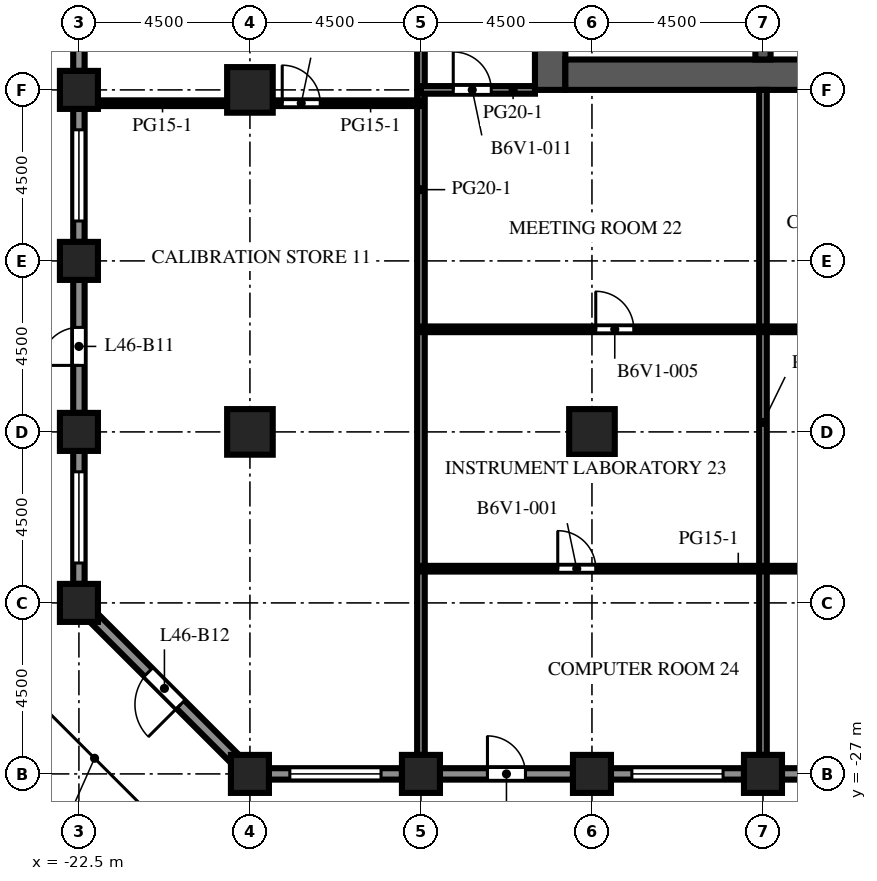
"""IFC4 building model, lengths in metres.
Left out: names, types, materials, properties, quantities, classifications, styles, units other than length and angle.
Written with IfcOpenShell. Run it as: python <this file> out.ifc"""

import sys

from ifc_helpers import new_model, si_unit, direction, frame, frame_2d, origin, origin_2d, place, context, subcontext, project, spatial, rectangle, extrude, element, fill, save


model = new_model("IFC4")
c1 = context("Model", 3, precision=1e-05, world=origin(), true_north=direction((0.0, 1.0)))
c2 = subcontext(c1, "Body", "Model", "MODEL_VIEW")
j1 = project(units=[si_unit("LENGTHUNIT", "METRE"), si_unit("PLANEANGLEUNIT", "RADIAN")], contexts=[c1])
p1 = place(None, origin())
s1 = spatial("IfcSite", under=j1, at=p1, CompositionType="ELEMENT")
p2 = place(p1, origin())
s2 = spatial("IfcBuilding", under=s1, at=p2, CompositionType="ELEMENT")
p3 = place(p2, frame((0.0, 0.0, 203.8)))
s3 = spatial("IfcBuildingStorey", under=s2, at=p3, CompositionType="ELEMENT", Elevation=203.8)
for number, where, z_axis, x_axis in (
    (1, (-22.5, -22.5, 0.0), (0.0, 0.0, 1.0), (1.0, 0.0, 0.0)),
    (2, (-22.5, -18.0, 0.0), (0.0, 0.0, 1.0), (1.0, 0.0, 0.0)),
    (3, (-22.5, -13.5, 0.0), (0.0, 0.0, 1.0), (1.0, 0.0, 0.0)),
    (4, (-22.5, -9.0, 0.0), (0.0, 0.0, 1.0), (1.0, 0.0, 0.0)),
    (5, (-18.0, -27.0, 0.0), (0.0, 0.0, 1.0), (1.0, 0.0, 0.0)),
    (6, (-13.5, -27.0, 0.0), (0.0, 0.0, 1.0), (1.0, 0.0, 0.0)),
    (7, (-9.0, -27.0, 0.0), (0.0, 0.0, 1.0), (1.0, 0.0, 0.0)),
    (8, (-4.5, -27.0, 0.0), (0.0, 0.0, 1.0), (1.0, 0.0, 0.0)),
):
    element("IfcColumn", number, at=place(p3, frame(where, z_axis=z_axis, x_axis=x_axis)), inside=s3, PredefinedType="COLUMN", context=c2, shape_type="SweptSolid", body=[
        extrude(rectangle(XDim=1.0, YDim=1.0, at=origin_2d()), origin(), (0.0, 0.0, 1.0), 4.1),
    ])
for number, where, z_axis, x_axis in (
    (9, (-18.0, -18.0, 0.0), (0.0, 0.0, 1.0), (1.0, 0.0, 0.0)),
    (10, (-18.0, -9.0, 0.0), (0.0, 0.0, 1.0), (1.0, 0.0, 0.0)),
    (11, (-9.0, -18.0, 0.0), (0.0, 0.0, 1.0), (1.0, 0.0, 0.0)),
):
    element("IfcColumn", number, at=place(p3, frame(where, z_axis=z_axis, x_axis=x_axis)), inside=s3, PredefinedType="COLUMN", context=c2, shape_type="SweptSolid", body=[
        extrude(rectangle(XDim=1.2, YDim=1.2, at=origin_2d()), origin(), (0.0, 0.0, 1.0), 4.1),
    ])
p4 = place(p3, frame((-10.1, -9.0, 0.0), z_axis=(0.0, 0.0, 1.0), x_axis=(0.0, 1.0, 0.0)))
e12 = element("IfcWall", 12, at=p4, inside=s3, PredefinedType="SHEAR", context=c2, shape_type="SweptSolid", body=[
    extrude(rectangle(XDim=27.5, YDim=0.8, at=frame_2d((13.75, 0.0))), origin(), (0.0, 0.0, 1.0), 4.1),
])
p5 = place(p4, frame((12.55, 0.0, 0.0)))
e13 = element("IfcOpeningElement", 13, at=p5, cuts=e12, PredefinedType="OPENING", context=c2, shape_type="SweptSolid", body=[
    extrude(rectangle(XDim=2.4, YDim=2.4, at=frame_2d((1.2, 1.2))), frame((0.0, 0.41, 0.0), z_axis=(0.0, -1.0, 0.0), x_axis=(1.0, 0.0, 0.0)), (0.0, 0.0, 1.0), 0.82),
])
p6 = place(p4, frame((6.825, 0.0, 0.0)))
e14 = element("IfcOpeningElement", 14, at=p6, cuts=e12, PredefinedType="OPENING", context=c2, shape_type="SweptSolid", body=[
    extrude(rectangle(XDim=1.2, YDim=2.1, at=frame_2d((0.6, 1.05))), frame((0.0, 0.41, 0.0), z_axis=(0.0, -1.0, 0.0), x_axis=(1.0, 0.0, 0.0)), (0.0, 0.0, 1.0), 0.82),
])
p7 = place(p4, frame((19.475, 0.0, 0.0)))
e15 = element("IfcOpeningElement", 15, at=p7, cuts=e12, PredefinedType="OPENING", context=c2, shape_type="SweptSolid", body=[
    extrude(rectangle(XDim=1.2, YDim=2.1, at=frame_2d((0.6, 1.05))), frame((0.0, 0.41, 0.0), z_axis=(0.0, -1.0, 0.0), x_axis=(1.0, 0.0, 0.0)), (0.0, 0.0, 1.0), 0.82),
])
p8 = place(p3, frame((-9.7, -8.6, 0.0), z_axis=(0.0, 0.0, 1.0), x_axis=(1.0, 0.0, 0.0)))
e16 = element("IfcWall", 16, at=p8, inside=s3, PredefinedType="SHEAR", context=c2, shape_type="SweptSolid", body=[
    extrude(rectangle(XDim=10.4, YDim=0.8, at=frame_2d((5.2, 0.0))), origin(), (0.0, 0.0, 1.0), 4.1),
])
p9 = place(p3, frame((-4.5, -8.2, 0.0), z_axis=(0.0, 0.0, 1.0), x_axis=(0.0, 1.0, 0.0)))
e17 = element("IfcWall", 17, at=p9, inside=s3, PredefinedType="SHEAR", context=c2, shape_type="SweptSolid", body=[
    extrude(rectangle(XDim=7.5, YDim=0.4, at=frame_2d((3.75, 0.0))), origin(), (0.0, 0.0, 1.0), 4.1),
])
p10 = place(p3, frame((-14.0, -27.0, 0.0), z_axis=(0.0, 0.0, 1.0), x_axis=(-1.0, 0.0, 0.0)))
e18 = element("IfcWall", 18, at=p10, inside=s3, PredefinedType="SOLIDWALL", context=c2, shape_type="SweptSolid", body=[
    extrude(rectangle(XDim=3.5, YDim=0.3, at=frame_2d((1.75, 0.0))), origin(), (0.0, 0.0, 1.0), 2.85),
])
p11 = place(p10, frame((0.55, 0.0, 0.8)))
e19 = element("IfcOpeningElement", 19, at=p11, cuts=e18, PredefinedType="OPENING", context=c2, shape_type="SweptSolid", body=[
    extrude(rectangle(XDim=2.4, YDim=1.7, at=frame_2d((1.2, 0.85))), frame((0.0, 0.16, 0.0), z_axis=(0.0, -1.0, 0.0), x_axis=(1.0, 0.0, 0.0)), (0.0, 0.0, 1.0), 0.32),
])
p12 = place(p3, frame((-9.5, -27.0, 0.0), z_axis=(0.0, 0.0, 1.0), x_axis=(-1.0, 0.0, 0.0)))
e20 = element("IfcWall", 20, at=p12, inside=s3, PredefinedType="SOLIDWALL", context=c2, shape_type="SweptSolid", body=[
    extrude(rectangle(XDim=3.5, YDim=0.3, at=frame_2d((1.75, 0.0))), origin(), (0.0, 0.0, 1.0), 2.85),
])
p13 = place(p12, frame((1.25, 0.0, 0.0)))
e21 = element("IfcOpeningElement", 21, at=p13, cuts=e20, PredefinedType="OPENING", context=c2, shape_type="SweptSolid", body=[
    extrude(rectangle(XDim=1.0, YDim=2.2, at=frame_2d((0.5, 1.1))), frame((0.0, 0.16, 0.0), z_axis=(0.0, -1.0, 0.0), x_axis=(1.0, 0.0, 0.0)), (0.0, 0.0, 1.0), 0.32),
])
p14 = place(p3, frame((-5.0, -27.0, 0.0), z_axis=(0.0, 0.0, 1.0), x_axis=(-1.0, 0.0, 0.0)))
e22 = element("IfcWall", 22, at=p14, inside=s3, PredefinedType="SOLIDWALL", context=c2, shape_type="SweptSolid", body=[
    extrude(rectangle(XDim=3.5, YDim=0.3, at=frame_2d((1.75, 0.0))), origin(), (0.0, 0.0, 1.0), 2.85),
])
p15 = place(p14, frame((0.55, 0.0, 0.8)))
e23 = element("IfcOpeningElement", 23, at=p15, cuts=e22, PredefinedType="OPENING", context=c2, shape_type="SweptSolid", body=[
    extrude(rectangle(XDim=2.4, YDim=1.7, at=frame_2d((1.2, 0.85))), frame((0.0, 0.16, 0.0), z_axis=(0.0, -1.0, 0.0), x_axis=(1.0, 0.0, 0.0)), (0.0, 0.0, 1.0), 0.32),
])
p16 = place(p3, frame((-0.5, -27.0, 0.0), z_axis=(0.0, 0.0, 1.0), x_axis=(-1.0, 0.0, 0.0)))
e24 = element("IfcWall", 24, at=p16, inside=s3, PredefinedType="SOLIDWALL", context=c2, shape_type="SweptSolid", body=[
    extrude(rectangle(XDim=3.5, YDim=0.3, at=frame_2d((1.75, 0.0))), origin(), (0.0, 0.0, 1.0), 2.85),
])
p17 = place(p16, frame((0.55, 0.0, 0.8)))
e25 = element("IfcOpeningElement", 25, at=p17, cuts=e24, PredefinedType="OPENING", context=c2, shape_type="SweptSolid", body=[
    extrude(rectangle(XDim=2.4, YDim=1.7, at=frame_2d((1.2, 0.85))), frame((0.0, 0.16, 0.0), z_axis=(0.0, -1.0, 0.0), x_axis=(1.0, 0.0, 0.0)), (0.0, 0.0, 1.0), 0.32),
])
p18 = place(p3, frame((-22.5, -8.5, 0.0), z_axis=(0.0, 0.0, 1.0), x_axis=(0.0, 1.0, 0.0)))
e26 = element("IfcWall", 26, at=p18, inside=s3, PredefinedType="SOLIDWALL", context=c2, shape_type="SweptSolid", body=[
    extrude(rectangle(XDim=3.5, YDim=0.3, at=frame_2d((1.75, 0.0))), origin(), (0.0, 0.0, 1.0), 2.85),
])
p19 = place(p18, frame((0.55, 0.0, 0.8)))
e27 = element("IfcOpeningElement", 27, at=p19, cuts=e26, PredefinedType="OPENING", context=c2, shape_type="SweptSolid", body=[
    extrude(rectangle(XDim=2.4, YDim=1.7, at=frame_2d((1.2, 0.85))), frame((0.0, 0.16, 0.0), z_axis=(0.0, -1.0, 0.0), x_axis=(1.0, 0.0, 0.0)), (0.0, 0.0, 1.0), 0.32),
])
p20 = place(p3, frame((-22.5, -13.0, 0.0), z_axis=(0.0, 0.0, 1.0), x_axis=(0.0, 1.0, 0.0)))
e28 = element("IfcWall", 28, at=p20, inside=s3, PredefinedType="SOLIDWALL", context=c2, shape_type="SweptSolid", body=[
    extrude(rectangle(XDim=3.5, YDim=0.3, at=frame_2d((1.75, 0.0))), origin(), (0.0, 0.0, 1.0), 2.85),
])
p21 = place(p20, frame((0.55, 0.0, 0.8)))
e29 = element("IfcOpeningElement", 29, at=p21, cuts=e28, PredefinedType="OPENING", context=c2, shape_type="SweptSolid", body=[
    extrude(rectangle(XDim=2.4, YDim=1.7, at=frame_2d((1.2, 0.85))), frame((0.0, 0.16, 0.0), z_axis=(0.0, -1.0, 0.0), x_axis=(1.0, 0.0, 0.0)), (0.0, 0.0, 1.0), 0.32),
])
p22 = place(p3, frame((-22.5, -17.5, 0.0), z_axis=(0.0, 0.0, 1.0), x_axis=(0.0, 1.0, 0.0)))
e30 = element("IfcWall", 30, at=p22, inside=s3, PredefinedType="SOLIDWALL", context=c2, shape_type="SweptSolid", body=[
    extrude(rectangle(XDim=3.5, YDim=0.3, at=frame_2d((1.75, 0.0))), origin(), (0.0, 0.0, 1.0), 2.85),
])
p23 = place(p22, frame((1.25, 0.0, 0.0)))
e31 = element("IfcOpeningElement", 31, at=p23, cuts=e30, PredefinedType="OPENING", context=c2, shape_type="SweptSolid", body=[
    extrude(rectangle(XDim=1.0, YDim=2.2, at=frame_2d((0.5, 1.1))), frame((0.0, 0.16, 0.0), z_axis=(0.0, -1.0, 0.0), x_axis=(1.0, 0.0, 0.0)), (0.0, 0.0, 1.0), 0.32),
])
p24 = place(p3, frame((-22.5, -22.0, 0.0), z_axis=(0.0, 0.0, 1.0), x_axis=(0.0, 1.0, 0.0)))
e32 = element("IfcWall", 32, at=p24, inside=s3, PredefinedType="SOLIDWALL", context=c2, shape_type="SweptSolid", body=[
    extrude(rectangle(XDim=3.5, YDim=0.3, at=frame_2d((1.75, 0.0))), origin(), (0.0, 0.0, 1.0), 2.85),
])
p25 = place(p24, frame((0.55, 0.0, 0.8)))
e33 = element("IfcOpeningElement", 33, at=p25, cuts=e32, PredefinedType="OPENING", context=c2, shape_type="SweptSolid", body=[
    extrude(rectangle(XDim=2.4, YDim=1.7, at=frame_2d((1.2, 0.85))), frame((0.0, 0.16, 0.0), z_axis=(0.0, -1.0, 0.0), x_axis=(1.0, 0.0, 0.0)), (0.0, 0.0, 1.0), 0.32),
])
p26 = place(p3, frame((-18.394, -26.606, 0.0), z_axis=(0.0, 0.0, 1.0), x_axis=(-0.707106781187, 0.707106781187, 0.0)))
e34 = element("IfcWall", 34, at=p26, inside=s3, PredefinedType="SOLIDWALL", context=c2, shape_type="SweptSolid", body=[
    extrude(rectangle(XDim=5.25, YDim=0.3, at=frame_2d((2.625, 0.0))), origin(), (0.0, 0.0, 1.0), 2.85),
])
p27 = place(p26, frame((2.025, 0.0, 0.0)))
e35 = element("IfcOpeningElement", 35, at=p27, cuts=e34, PredefinedType="OPENING", context=c2, shape_type="SweptSolid", body=[
    extrude(rectangle(XDim=1.2, YDim=2.2, at=frame_2d((0.6, 1.1))), frame((0.0, 0.16, 0.0), z_axis=(0.0, -1.0, 0.0), x_axis=(1.0, 0.0, 0.0)), (0.0, 0.0, 1.0), 0.32),
])
p28 = place(p3, frame((-13.5, -26.5, 0.0), z_axis=(0.0, 0.0, 1.0), x_axis=(0.0, 1.0, 0.0)))
e36 = element("IfcWall", 36, at=p28, inside=s3, PredefinedType="PARTITIONING", context=c2, shape_type="SweptSolid", body=[
    extrude(rectangle(XDim=29.75, YDim=0.2, at=frame_2d((14.875, 0.0))), origin(), (0.0, 0.0, 1.0), 3.65),
])
p29 = place(p3, frame((-4.5, -26.5, 0.0), z_axis=(0.0, 0.0, 1.0), x_axis=(0.0, 1.0, 0.0)))
e37 = element("IfcWall", 37, at=p29, inside=s3, PredefinedType="PARTITIONING", context=c2, shape_type="SweptSolid", body=[
    extrude(rectangle(XDim=17.5, YDim=0.2, at=frame_2d((8.75, 0.0))), origin(), (0.0, 0.0, 1.0), 3.65),
])
p30 = place(p3, frame((21.0, -21.6, 0.0), z_axis=(0.0, 0.0, 1.0), x_axis=(-1.0, 0.0, 0.0)))
e38 = element("IfcWall", 38, at=p30, inside=s3, PredefinedType="PARTITIONING", context=c2, shape_type="SweptSolid", body=[
    extrude(rectangle(XDim=34.5, YDim=0.15, at=frame_2d((17.25, 0.0))), origin(), (0.0, 0.0, 1.0), 3.65),
])
p31 = place(p30, frame((29.9, 0.0, 0.0)))
e39 = element("IfcOpeningElement", 39, at=p31, cuts=e38, PredefinedType="OPENING", context=c2, shape_type="SweptSolid", body=[
    extrude(rectangle(XDim=1.0, YDim=2.1, at=frame_2d((0.5, 1.05))), frame((0.0, 0.085, 0.0), z_axis=(0.0, -1.0, 0.0), x_axis=(1.0, 0.0, 0.0)), (0.0, 0.0, 1.0), 0.17),
])
p32 = place(p30, frame((21.4, 0.0, 0.0)))
e40 = element("IfcOpeningElement", 40, at=p32, cuts=e38, PredefinedType="OPENING", context=c2, shape_type="SweptSolid", body=[
    extrude(rectangle(XDim=1.0, YDim=2.1, at=frame_2d((0.5, 1.05))), frame((0.0, 0.085, 0.0), z_axis=(0.0, -1.0, 0.0), x_axis=(1.0, 0.0, 0.0)), (0.0, 0.0, 1.0), 0.17),
])
p33 = place(p30, frame((13.15, 0.0, 0.0)))
e41 = element("IfcOpeningElement", 41, at=p33, cuts=e38, PredefinedType="OPENING", context=c2, shape_type="SweptSolid", body=[
    extrude(rectangle(XDim=1.0, YDim=2.1, at=frame_2d((0.5, 1.05))), frame((0.0, 0.085, 0.0), z_axis=(0.0, -1.0, 0.0), x_axis=(1.0, 0.0, 0.0)), (0.0, 0.0, 1.0), 0.17),
])
p34 = place(p30, frame((5.15, 0.0, 0.0)))
e42 = element("IfcOpeningElement", 42, at=p34, cuts=e38, PredefinedType="OPENING", context=c2, shape_type="SweptSolid", body=[
    extrude(rectangle(XDim=1.0, YDim=2.1, at=frame_2d((0.5, 1.05))), frame((0.0, 0.085, 0.0), z_axis=(0.0, -1.0, 0.0), x_axis=(1.0, 0.0, 0.0)), (0.0, 0.0, 1.0), 0.17),
])
p35 = place(p3, frame((21.0, -15.3, 0.0), z_axis=(0.0, 0.0, 1.0), x_axis=(-1.0, 0.0, 0.0)))
e43 = element("IfcWall", 43, at=p35, inside=s3, PredefinedType="PARTITIONING", context=c2, shape_type="SweptSolid", body=[
    extrude(rectangle(XDim=34.5, YDim=0.15, at=frame_2d((17.25, 0.0))), origin(), (0.0, 0.0, 1.0), 3.65),
])
p36 = place(p35, frame((28.9, 0.0, 0.0)))
e44 = element("IfcOpeningElement", 44, at=p36, cuts=e43, PredefinedType="OPENING", context=c2, shape_type="SweptSolid", body=[
    extrude(rectangle(XDim=1.0, YDim=2.1, at=frame_2d((0.5, 1.05))), frame((0.0, 0.085, 0.0), z_axis=(0.0, -1.0, 0.0), x_axis=(1.0, 0.0, 0.0)), (0.0, 0.0, 1.0), 0.17),
])
p37 = place(p35, frame((19.4, 0.0, 0.0)))
e45 = element("IfcOpeningElement", 45, at=p37, cuts=e43, PredefinedType="OPENING", context=c2, shape_type="SweptSolid", body=[
    extrude(rectangle(XDim=1.0, YDim=2.1, at=frame_2d((0.5, 1.05))), frame((0.0, 0.085, 0.0), z_axis=(0.0, -1.0, 0.0), x_axis=(1.0, 0.0, 0.0)), (0.0, 0.0, 1.0), 0.17),
])
p38 = place(p35, frame((14.15, 0.0, 0.0)))
e46 = element("IfcOpeningElement", 46, at=p38, cuts=e43, PredefinedType="OPENING", context=c2, shape_type="SweptSolid", body=[
    extrude(rectangle(XDim=1.0, YDim=2.1, at=frame_2d((0.5, 1.05))), frame((0.0, 0.085, 0.0), z_axis=(0.0, -1.0, 0.0), x_axis=(1.0, 0.0, 0.0)), (0.0, 0.0, 1.0), 0.17),
])
p39 = place(p35, frame((3.9, 0.0, 0.0)))
e47 = element("IfcOpeningElement", 47, at=p39, cuts=e43, PredefinedType="OPENING", context=c2, shape_type="SweptSolid", body=[
    extrude(rectangle(XDim=1.0, YDim=2.1, at=frame_2d((0.5, 1.05))), frame((0.0, 0.085, 0.0), z_axis=(0.0, -1.0, 0.0), x_axis=(1.0, 0.0, 0.0)), (0.0, 0.0, 1.0), 0.17),
])
p40 = place(p3, frame((-22.0, -9.35, 0.0), z_axis=(0.0, 0.0, 1.0), x_axis=(1.0, 0.0, 0.0)))
e48 = element("IfcWall", 48, at=p40, inside=s3, PredefinedType="PARTITIONING", context=c2, shape_type="SweptSolid", body=[
    extrude(rectangle(XDim=3.4, YDim=0.15, at=frame_2d((1.7, 0.0))), origin(), (0.0, 0.0, 1.0), 3.65),
])
p41 = place(p3, frame((-13.5, -9.35, 0.0), z_axis=(0.0, 0.0, 1.0), x_axis=(-1.0, 0.0, 0.0)))
e49 = element("IfcWall", 49, at=p41, inside=s3, PredefinedType="PARTITIONING", context=c2, shape_type="SweptSolid", body=[
    extrude(rectangle(XDim=3.9, YDim=0.15, at=frame_2d((1.95, 0.0))), origin(), (0.0, 0.0, 1.0), 3.65),
])
p42 = place(p41, frame((2.65, 0.0, 0.0)))
e50 = element("IfcOpeningElement", 50, at=p42, cuts=e49, PredefinedType="OPENING", context=c2, shape_type="SweptSolid", body=[
    extrude(rectangle(XDim=1.0, YDim=2.1, at=frame_2d((0.5, 1.05))), frame((0.0, 0.085, 0.0), z_axis=(0.0, -1.0, 0.0), x_axis=(1.0, 0.0, 0.0)), (0.0, 0.0, 1.0), 0.17),
])
p43 = place(p3, frame((-10.5, -9.0, 0.0), z_axis=(0.0, 0.0, 1.0), x_axis=(-1.0, 0.0, 0.0)))
e51 = element("IfcWall", 51, at=p43, inside=s3, PredefinedType="PARTITIONING", context=c2, shape_type="SweptSolid", body=[
    extrude(rectangle(XDim=3.0, YDim=0.2, at=frame_2d((1.5, 0.0))), origin(), (0.0, 0.0, 1.0), 3.65),
])
p44 = place(p43, frame((1.15, 0.0, 0.0)))
e52 = element("IfcOpeningElement", 52, at=p44, cuts=e51, PredefinedType="OPENING", context=c2, shape_type="SweptSolid", body=[
    extrude(rectangle(XDim=1.0, YDim=2.1, at=frame_2d((0.5, 1.05))), frame((0.0, 0.11, 0.0), z_axis=(0.0, -1.0, 0.0), x_axis=(1.0, 0.0, 0.0)), (0.0, 0.0, 1.0), 0.22),
])
p45 = place(p11, origin())
e53 = element("IfcWindow", 53, at=p45, inside=s3, PartitioningType="SINGLE_PANEL", PredefinedType="WINDOW", context=c2, shape_type="SweptSolid", body=[
    extrude(rectangle(XDim=2.4, YDim=1.7, at=frame_2d((1.2, 0.85))), frame((0.0, 0.03, 0.0), z_axis=(0.0, -1.0, 0.0), x_axis=(1.0, 0.0, 0.0)), (0.0, 0.0, 1.0), 0.06),
])
fill(e19, e53)
p46 = place(p13, origin())
e54 = element("IfcDoor", 54, at=p46, inside=s3, OperationType="SINGLE_SWING_RIGHT", PredefinedType="DOOR", context=c2, shape_type="SweptSolid", body=[
    extrude(rectangle(XDim=1.0, YDim=2.2, at=frame_2d((0.5, 1.1))), frame((0.0, 0.025, 0.0), z_axis=(0.0, -1.0, 0.0), x_axis=(1.0, 0.0, 0.0)), (0.0, 0.0, 1.0), 0.05),
])
fill(e21, e54)
p47 = place(p15, origin())
e55 = element("IfcWindow", 55, at=p47, inside=s3, PartitioningType="SINGLE_PANEL", PredefinedType="WINDOW", context=c2, shape_type="SweptSolid", body=[
    extrude(rectangle(XDim=2.4, YDim=1.7, at=frame_2d((1.2, 0.85))), frame((0.0, 0.03, 0.0), z_axis=(0.0, -1.0, 0.0), x_axis=(1.0, 0.0, 0.0)), (0.0, 0.0, 1.0), 0.06),
])
fill(e23, e55)
p48 = place(p21, origin())
e56 = element("IfcWindow", 56, at=p48, inside=s3, PartitioningType="SINGLE_PANEL", PredefinedType="WINDOW", context=c2, shape_type="SweptSolid", body=[
    extrude(rectangle(XDim=2.4, YDim=1.7, at=frame_2d((1.2, 0.85))), frame((0.0, 0.03, 0.0), z_axis=(0.0, -1.0, 0.0), x_axis=(1.0, 0.0, 0.0)), (0.0, 0.0, 1.0), 0.06),
])
fill(e29, e56)
p49 = place(p23, origin())
e57 = element("IfcDoor", 57, at=p49, inside=s3, OperationType="SINGLE_SWING_LEFT", PredefinedType="DOOR", context=c2, shape_type="SweptSolid", body=[
    extrude(rectangle(XDim=1.0, YDim=2.2, at=frame_2d((0.5, 1.1))), frame((0.0, 0.025, 0.0), z_axis=(0.0, -1.0, 0.0), x_axis=(1.0, 0.0, 0.0)), (0.0, 0.0, 1.0), 0.05),
])
fill(e31, e57)
p50 = place(p25, origin())
e58 = element("IfcWindow", 58, at=p50, inside=s3, PartitioningType="SINGLE_PANEL", PredefinedType="WINDOW", context=c2, shape_type="SweptSolid", body=[
    extrude(rectangle(XDim=2.4, YDim=1.7, at=frame_2d((1.2, 0.85))), frame((0.0, 0.03, 0.0), z_axis=(0.0, -1.0, 0.0), x_axis=(1.0, 0.0, 0.0)), (0.0, 0.0, 1.0), 0.06),
])
fill(e33, e58)
p51 = place(p27, origin())
e59 = element("IfcDoor", 59, at=p51, inside=s3, OperationType="SINGLE_SWING_LEFT", PredefinedType="DOOR", context=c2, shape_type="SweptSolid", body=[
    extrude(rectangle(XDim=1.2, YDim=2.2, at=frame_2d((0.6, 1.1))), frame((0.0, 0.025, 0.0), z_axis=(0.0, -1.0, 0.0), x_axis=(1.0, 0.0, 0.0)), (0.0, 0.0, 1.0), 0.05),
])
fill(e35, e59)
p52 = place(p31, origin())
e60 = element("IfcDoor", 60, at=p52, inside=s3, OperationType="SINGLE_SWING_RIGHT", PredefinedType="DOOR", context=c2, shape_type="SweptSolid", body=[
    extrude(rectangle(XDim=1.0, YDim=2.1, at=frame_2d((0.5, 1.05))), frame((0.0, 0.025, 0.0), z_axis=(0.0, -1.0, 0.0), x_axis=(1.0, 0.0, 0.0)), (0.0, 0.0, 1.0), 0.05),
])
fill(e39, e60)
p53 = place(p36, origin())
e61 = element("IfcDoor", 61, at=p53, inside=s3, OperationType="SINGLE_SWING_RIGHT", PredefinedType="DOOR", context=c2, shape_type="SweptSolid", body=[
    extrude(rectangle(XDim=1.0, YDim=2.1, at=frame_2d((0.5, 1.05))), frame((0.0, 0.025, 0.0), z_axis=(0.0, -1.0, 0.0), x_axis=(1.0, 0.0, 0.0)), (0.0, 0.0, 1.0), 0.05),
])
fill(e44, e61)
p54 = place(p42, origin())
e62 = element("IfcDoor", 62, at=p54, inside=s3, OperationType="SINGLE_SWING_RIGHT", PredefinedType="DOOR", context=c2, shape_type="SweptSolid", body=[
    extrude(rectangle(XDim=1.0, YDim=2.1, at=frame_2d((0.5, 1.05))), frame((0.0, 0.025, 0.0), z_axis=(0.0, -1.0, 0.0), x_axis=(1.0, 0.0, 0.0)), (0.0, 0.0, 1.0), 0.05),
])
fill(e50, e62)
p55 = place(p44, origin())
e63 = element("IfcDoor", 63, at=p55, inside=s3, OperationType="SINGLE_SWING_RIGHT", PredefinedType="DOOR", context=c2, shape_type="SweptSolid", body=[
    extrude(rectangle(XDim=1.0, YDim=2.1, at=frame_2d((0.5, 1.05))), frame((0.0, 0.025, 0.0), z_axis=(0.0, -1.0, 0.0), x_axis=(1.0, 0.0, 0.0)), (0.0, 0.0, 1.0), 0.05),
])
fill(e52, e63)
save(model, sys.argv[1])
